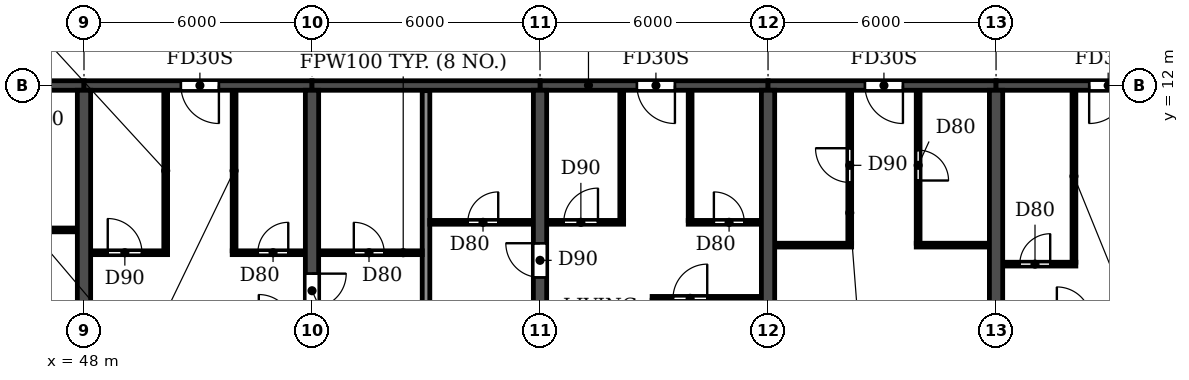
"""IFC4 building model, lengths in metres.
Left out: names, types, materials, properties, quantities, classifications, styles, units other than length and angle.
Written with IfcOpenShell. Run it as: python <this file> out.ifc"""

import sys

from ifc_helpers import new_model, si_unit, direction, frame, frame_2d, origin, place, context, subcontext, project, spatial, rectangle, extrude, element, fill, save


model = new_model("IFC4")
c1 = context("Model", 3, precision=1e-05, world=origin(), true_north=direction((0.0, 1.0)))
c2 = subcontext(c1, "Body", "Model", "MODEL_VIEW")
j1 = project(units=[si_unit("LENGTHUNIT", "METRE"), si_unit("PLANEANGLEUNIT", "RADIAN")], contexts=[c1])
p1 = place(None, origin())
s1 = spatial("IfcSite", under=j1, at=p1, CompositionType="ELEMENT")
p2 = place(p1, origin())
s2 = spatial("IfcBuilding", under=s1, at=p2, CompositionType="ELEMENT")
p3 = place(p2, frame((0.0, 0.0, 76.2)))
s3 = spatial("IfcBuildingStorey", under=s2, at=p3, CompositionType="ELEMENT", Elevation=76.2)
p4 = place(p3, frame((48.0, 0.2, 0.0), z_axis=(0.0, 0.0, 1.0), x_axis=(0.0, 1.0, 0.0)))
e1 = element("IfcWall", 1, at=p4, inside=s3, PredefinedType="SHEAR", context=c2, shape_type="SweptSolid", body=[
    extrude(rectangle(XDim=11.675, YDim=0.35, at=frame_2d((5.837, 0.0))), origin(), (0.0, 0.0, 1.0), 3.06),
])
p5 = place(p3, frame((54.0, 0.2, 0.0), z_axis=(0.0, 0.0, 1.0), x_axis=(0.0, 1.0, 0.0)))
e2 = element("IfcWall", 2, at=p5, inside=s3, PredefinedType="SHEAR", context=c2, shape_type="SweptSolid", body=[
    extrude(rectangle(XDim=11.675, YDim=0.35, at=frame_2d((5.837, 0.0))), origin(), (0.0, 0.0, 1.0), 3.06),
])
p6 = place(p5, frame((5.95, 0.0, 0.0)))
e3 = element("IfcOpeningElement", 3, at=p6, cuts=e2, PredefinedType="OPENING", context=c2, shape_type="SweptSolid", body=[
    extrude(rectangle(XDim=0.9, YDim=2.1, at=frame_2d((0.45, 1.05))), frame((0.0, 0.185, 0.0), z_axis=(0.0, -1.0, 0.0), x_axis=(1.0, 0.0, 0.0)), (0.0, 0.0, 1.0), 0.37),
])
p7 = place(p3, frame((60.0, 0.2, 0.0), z_axis=(0.0, 0.0, 1.0), x_axis=(0.0, 1.0, 0.0)))
e4 = element("IfcWall", 4, at=p7, inside=s3, PredefinedType="SHEAR", context=c2, shape_type="SweptSolid", body=[
    extrude(rectangle(XDim=11.675, YDim=0.35, at=frame_2d((5.837, 0.0))), origin(), (0.0, 0.0, 1.0), 3.06),
])
p8 = place(p7, frame((6.75, 0.0, 0.0)))
e5 = element("IfcOpeningElement", 5, at=p8, cuts=e4, PredefinedType="OPENING", context=c2, shape_type="SweptSolid", body=[
    extrude(rectangle(XDim=0.9, YDim=2.1, at=frame_2d((0.45, 1.05))), frame((0.0, 0.185, 0.0), z_axis=(0.0, -1.0, 0.0), x_axis=(1.0, 0.0, 0.0)), (0.0, 0.0, 1.0), 0.37),
])
for number, where, z_axis, x_axis in (
    (6, (66.0, 0.2, 0.0), (0.0, 0.0, 1.0), (0.0, 1.0, 0.0)),
    (7, (72.0, 0.2, 0.0), (0.0, 0.0, 1.0), (0.0, 1.0, 0.0)),
):
    element("IfcWall", number, at=place(p3, frame(where, z_axis=z_axis, x_axis=x_axis)), inside=s3, PredefinedType="SHEAR", context=c2, shape_type="SweptSolid", body=[
        extrude(rectangle(XDim=11.675, YDim=0.35, at=frame_2d((5.837, 0.0))), origin(), (0.0, 0.0, 1.0), 3.06),
    ])
p9 = place(p3, frame((42.0, 12.0, 0.0), z_axis=(0.0, 0.0, 1.0), x_axis=(1.0, 0.0, 0.0)))
e8 = element("IfcWall", 8, at=p9, inside=s3, PredefinedType="SHEAR", context=c2, shape_type="SweptSolid", body=[
    extrude(rectangle(XDim=6.0, YDim=0.25, at=frame_2d((3.0, 0.0))), origin(), (0.0, 0.0, 1.0), 2.46),
])
p10 = place(p9, frame((2.55, 0.0, 0.0)))
e9 = element("IfcOpeningElement", 9, at=p10, cuts=e8, PredefinedType="OPENING", context=c2, shape_type="SweptSolid", body=[
    extrude(rectangle(XDim=1.0, YDim=2.1, at=frame_2d((0.5, 1.05))), frame((0.0, 0.135, 0.0), z_axis=(0.0, -1.0, 0.0), x_axis=(1.0, 0.0, 0.0)), (0.0, 0.0, 1.0), 0.27),
])
p11 = place(p3, frame((48.0, 12.0, 0.0), z_axis=(0.0, 0.0, 1.0), x_axis=(1.0, 0.0, 0.0)))
e10 = element("IfcWall", 10, at=p11, inside=s3, PredefinedType="SHEAR", context=c2, shape_type="SweptSolid", body=[
    extrude(rectangle(XDim=6.0, YDim=0.25, at=frame_2d((3.0, 0.0))), origin(), (0.0, 0.0, 1.0), 2.46),
])
p12 = place(p11, frame((2.55, 0.0, 0.0)))
e11 = element("IfcOpeningElement", 11, at=p12, cuts=e10, PredefinedType="OPENING", context=c2, shape_type="SweptSolid", body=[
    extrude(rectangle(XDim=1.0, YDim=2.1, at=frame_2d((0.5, 1.05))), frame((0.0, 0.135, 0.0), z_axis=(0.0, -1.0, 0.0), x_axis=(1.0, 0.0, 0.0)), (0.0, 0.0, 1.0), 0.27),
])
p13 = place(p3, frame((54.0, 12.0, 0.0), z_axis=(0.0, 0.0, 1.0), x_axis=(1.0, 0.0, 0.0)))
e12 = element("IfcWall", 12, at=p13, inside=s3, PredefinedType="SHEAR", context=c2, shape_type="SweptSolid", body=[
    extrude(rectangle(XDim=6.0, YDim=0.25, at=frame_2d((3.0, 0.0))), origin(), (0.0, 0.0, 1.0), 2.46),
])
p14 = place(p3, frame((60.0, 12.0, 0.0), z_axis=(0.0, 0.0, 1.0), x_axis=(1.0, 0.0, 0.0)))
e13 = element("IfcWall", 13, at=p14, inside=s3, PredefinedType="SHEAR", context=c2, shape_type="SweptSolid", body=[
    extrude(rectangle(XDim=6.0, YDim=0.25, at=frame_2d((3.0, 0.0))), origin(), (0.0, 0.0, 1.0), 2.46),
])
p15 = place(p14, frame((2.55, 0.0, 0.0)))
e14 = element("IfcOpeningElement", 14, at=p15, cuts=e13, PredefinedType="OPENING", context=c2, shape_type="SweptSolid", body=[
    extrude(rectangle(XDim=1.0, YDim=2.1, at=frame_2d((0.5, 1.05))), frame((0.0, 0.135, 0.0), z_axis=(0.0, -1.0, 0.0), x_axis=(1.0, 0.0, 0.0)), (0.0, 0.0, 1.0), 0.27),
])
p16 = place(p3, frame((66.0, 12.0, 0.0), z_axis=(0.0, 0.0, 1.0), x_axis=(1.0, 0.0, 0.0)))
e15 = element("IfcWall", 15, at=p16, inside=s3, PredefinedType="SHEAR", context=c2, shape_type="SweptSolid", body=[
    extrude(rectangle(XDim=6.0, YDim=0.25, at=frame_2d((3.0, 0.0))), origin(), (0.0, 0.0, 1.0), 2.46),
])
p17 = place(p16, frame((2.55, 0.0, 0.0)))
e16 = element("IfcOpeningElement", 16, at=p17, cuts=e15, PredefinedType="OPENING", context=c2, shape_type="SweptSolid", body=[
    extrude(rectangle(XDim=1.0, YDim=2.1, at=frame_2d((0.5, 1.05))), frame((0.0, 0.135, 0.0), z_axis=(0.0, -1.0, 0.0), x_axis=(1.0, 0.0, 0.0)), (0.0, 0.0, 1.0), 0.27),
])
p18 = place(p3, frame((72.0, 12.0, 0.0), z_axis=(0.0, 0.0, 1.0), x_axis=(1.0, 0.0, 0.0)))
e17 = element("IfcWall", 17, at=p18, inside=s3, PredefinedType="SHEAR", context=c2, shape_type="SweptSolid", body=[
    extrude(rectangle(XDim=6.0, YDim=0.25, at=frame_2d((3.0, 0.0))), origin(), (0.0, 0.0, 1.0), 2.46),
])
p19 = place(p18, frame((2.45, 0.0, 0.0)))
e18 = element("IfcOpeningElement", 18, at=p19, cuts=e17, PredefinedType="OPENING", context=c2, shape_type="SweptSolid", body=[
    extrude(rectangle(XDim=1.0, YDim=2.1, at=frame_2d((0.5, 1.05))), frame((0.0, 0.135, 0.0), z_axis=(0.0, -1.0, 0.0), x_axis=(1.0, 0.0, 0.0)), (0.0, 0.0, 1.0), 0.27),
])
p20 = place(p3, frame((57.0, 0.06, 0.0), z_axis=(0.0, 0.0, 1.0), x_axis=(0.0, 1.0, 0.0)))
e19 = element("IfcWall", 19, at=p20, inside=s3, PredefinedType="PARTITIONING", context=c2, shape_type="SweptSolid", body=[
    extrude(rectangle(XDim=11.805, YDim=0.2, at=frame_2d((5.902, 0.0))), origin(), (0.0, 0.0, 1.0), 3.06),
])
p21 = place(p3, frame((62.95, 6.4, 0.0), z_axis=(0.0, 0.0, 1.0), x_axis=(1.0, 0.0, 0.0)))
e20 = element("IfcWall", 20, at=p21, inside=s3, PredefinedType="PARTITIONING", context=c2, shape_type="SweptSolid", body=[
    extrude(rectangle(XDim=2.865, YDim=0.1, at=frame_2d((1.433, 0.0))), origin(), (0.0, 0.0, 1.0), 3.06),
])
p22 = place(p21, frame((0.55, 0.0, 0.0)))
e21 = element("IfcOpeningElement", 21, at=p22, cuts=e20, PredefinedType="OPENING", context=c2, shape_type="SweptSolid", body=[
    extrude(rectangle(XDim=0.9, YDim=2.1, at=frame_2d((0.45, 1.05))), frame((0.0, 0.06, 0.0), z_axis=(0.0, -1.0, 0.0), x_axis=(1.0, 0.0, 0.0)), (0.0, 0.0, 1.0), 0.12),
])
p23 = place(p3, frame((72.185, 7.3, 0.0), z_axis=(0.0, 0.0, 1.0), x_axis=(1.0, 0.0, 0.0)))
e22 = element("IfcWall", 22, at=p23, inside=s3, PredefinedType="PARTITIONING", context=c2, shape_type="SweptSolid", body=[
    extrude(rectangle(XDim=1.915, YDim=0.1, at=frame_2d((0.958, 0.0))), origin(), (0.0, 0.0, 1.0), 3.06),
])
p24 = place(p23, frame((0.44, 0.0, 0.0)))
e23 = element("IfcOpeningElement", 23, at=p24, cuts=e22, PredefinedType="OPENING", context=c2, shape_type="SweptSolid", body=[
    extrude(rectangle(XDim=0.8, YDim=2.1, at=frame_2d((0.4, 1.05))), frame((0.0, 0.06, 0.0), z_axis=(0.0, -1.0, 0.0), x_axis=(1.0, 0.0, 0.0)), (0.0, 0.0, 1.0), 0.12),
])
p25 = place(p3, frame((48.185, 7.6, 0.0), z_axis=(0.0, 0.0, 1.0), x_axis=(1.0, 0.0, 0.0)))
e24 = element("IfcWall", 24, at=p25, inside=s3, PredefinedType="PARTITIONING", context=c2, shape_type="SweptSolid", body=[
    extrude(rectangle(XDim=2.015, YDim=0.1, at=frame_2d((1.007, 0.0))), origin(), (0.0, 0.0, 1.0), 3.06),
])
p26 = place(p25, frame((0.44, 0.0, 0.0)))
e25 = element("IfcOpeningElement", 25, at=p26, cuts=e24, PredefinedType="OPENING", context=c2, shape_type="SweptSolid", body=[
    extrude(rectangle(XDim=0.9, YDim=2.1, at=frame_2d((0.45, 1.05))), frame((0.0, 0.06, 0.0), z_axis=(0.0, -1.0, 0.0), x_axis=(1.0, 0.0, 0.0)), (0.0, 0.0, 1.0), 0.12),
])
p27 = place(p3, frame((51.9, 7.6, 0.0), z_axis=(0.0, 0.0, 1.0), x_axis=(1.0, 0.0, 0.0)))
e26 = element("IfcWall", 26, at=p27, inside=s3, PredefinedType="PARTITIONING", context=c2, shape_type="SweptSolid", body=[
    extrude(rectangle(XDim=1.915, YDim=0.1, at=frame_2d((0.958, 0.0))), origin(), (0.0, 0.0, 1.0), 3.06),
])
p28 = place(p27, frame((0.675, 0.0, 0.0)))
e27 = element("IfcOpeningElement", 27, at=p28, cuts=e26, PredefinedType="OPENING", context=c2, shape_type="SweptSolid", body=[
    extrude(rectangle(XDim=0.8, YDim=2.1, at=frame_2d((0.4, 1.05))), frame((0.0, 0.06, 0.0), z_axis=(0.0, -1.0, 0.0), x_axis=(1.0, 0.0, 0.0)), (0.0, 0.0, 1.0), 0.12),
])
p29 = place(p3, frame((54.185, 7.6, 0.0), z_axis=(0.0, 0.0, 1.0), x_axis=(1.0, 0.0, 0.0)))
e28 = element("IfcWall", 28, at=p29, inside=s3, PredefinedType="PARTITIONING", context=c2, shape_type="SweptSolid", body=[
    extrude(rectangle(XDim=2.715, YDim=0.1, at=frame_2d((1.357, 0.0))), origin(), (0.0, 0.0, 1.0), 3.06),
])
p30 = place(p29, frame((0.915, 0.0, 0.0)))
e29 = element("IfcOpeningElement", 29, at=p30, cuts=e28, PredefinedType="OPENING", context=c2, shape_type="SweptSolid", body=[
    extrude(rectangle(XDim=0.8, YDim=2.1, at=frame_2d((0.4, 1.05))), frame((0.0, 0.06, 0.0), z_axis=(0.0, -1.0, 0.0), x_axis=(1.0, 0.0, 0.0)), (0.0, 0.0, 1.0), 0.12),
])
p31 = place(p3, frame((66.185, 7.8, 0.0), z_axis=(0.0, 0.0, 1.0), x_axis=(1.0, 0.0, 0.0)))
e30 = element("IfcWall", 30, at=p31, inside=s3, PredefinedType="PARTITIONING", context=c2, shape_type="SweptSolid", body=[
    extrude(rectangle(XDim=2.015, YDim=0.1, at=frame_2d((1.007, 0.0))), origin(), (0.0, 0.0, 1.0), 3.06),
])
for number, where, z_axis, x_axis in (
    (31, (69.9, 7.8, 0.0), (0.0, 0.0, 1.0), (1.0, 0.0, 0.0)),
    (32, (45.9, 8.2, 0.0), (0.0, 0.0, 1.0), (1.0, 0.0, 0.0)),
):
    element("IfcWall", number, at=place(p3, frame(where, z_axis=z_axis, x_axis=x_axis)), inside=s3, PredefinedType="PARTITIONING", context=c2, shape_type="SweptSolid", body=[
        extrude(rectangle(XDim=1.915, YDim=0.1, at=frame_2d((0.958, 0.0))), origin(), (0.0, 0.0, 1.0), 3.06),
    ])
p32 = place(p3, frame((57.1, 8.4, 0.0), z_axis=(0.0, 0.0, 1.0), x_axis=(1.0, 0.0, 0.0)))
e33 = element("IfcWall", 33, at=p32, inside=s3, PredefinedType="PARTITIONING", context=c2, shape_type="SweptSolid", body=[
    extrude(rectangle(XDim=2.715, YDim=0.1, at=frame_2d((1.357, 0.0))), origin(), (0.0, 0.0, 1.0), 3.06),
])
p33 = place(p32, frame((1.0, 0.0, 0.0)))
e34 = element("IfcOpeningElement", 34, at=p33, cuts=e33, PredefinedType="OPENING", context=c2, shape_type="SweptSolid", body=[
    extrude(rectangle(XDim=0.8, YDim=2.1, at=frame_2d((0.4, 1.05))), frame((0.0, 0.06, 0.0), z_axis=(0.0, -1.0, 0.0), x_axis=(1.0, 0.0, 0.0)), (0.0, 0.0, 1.0), 0.12),
])
p34 = place(p3, frame((60.185, 8.4, 0.0), z_axis=(0.0, 0.0, 1.0), x_axis=(1.0, 0.0, 0.0)))
e35 = element("IfcWall", 35, at=p34, inside=s3, PredefinedType="PARTITIONING", context=c2, shape_type="SweptSolid", body=[
    extrude(rectangle(XDim=2.015, YDim=0.1, at=frame_2d((1.007, 0.0))), origin(), (0.0, 0.0, 1.0), 3.06),
])
p35 = place(p34, frame((0.44, 0.0, 0.0)))
e36 = element("IfcOpeningElement", 36, at=p35, cuts=e35, PredefinedType="OPENING", context=c2, shape_type="SweptSolid", body=[
    extrude(rectangle(XDim=0.9, YDim=2.1, at=frame_2d((0.45, 1.05))), frame((0.0, 0.06, 0.0), z_axis=(0.0, -1.0, 0.0), x_axis=(1.0, 0.0, 0.0)), (0.0, 0.0, 1.0), 0.12),
])
p36 = place(p3, frame((63.9, 8.4, 0.0), z_axis=(0.0, 0.0, 1.0), x_axis=(1.0, 0.0, 0.0)))
e37 = element("IfcWall", 37, at=p36, inside=s3, PredefinedType="PARTITIONING", context=c2, shape_type="SweptSolid", body=[
    extrude(rectangle(XDim=1.915, YDim=0.1, at=frame_2d((0.958, 0.0))), origin(), (0.0, 0.0, 1.0), 3.06),
])
p37 = place(p36, frame((0.675, 0.0, 0.0)))
e38 = element("IfcOpeningElement", 38, at=p37, cuts=e37, PredefinedType="OPENING", context=c2, shape_type="SweptSolid", body=[
    extrude(rectangle(XDim=0.8, YDim=2.1, at=frame_2d((0.4, 1.05))), frame((0.0, 0.06, 0.0), z_axis=(0.0, -1.0, 0.0), x_axis=(1.0, 0.0, 0.0)), (0.0, 0.0, 1.0), 0.12),
])
for number, where, z_axis, x_axis in (
    (39, (50.15, 7.65, 0.0), (0.0, 0.0, 1.0), (0.0, 1.0, 0.0)),
    (40, (51.95, 7.65, 0.0), (0.0, 0.0, 1.0), (0.0, 1.0, 0.0)),
):
    element("IfcWall", number, at=place(p3, frame(where, z_axis=z_axis, x_axis=x_axis)), inside=s3, PredefinedType="PARTITIONING", context=c2, shape_type="SweptSolid", body=[
        extrude(rectangle(XDim=4.215, YDim=0.1, at=frame_2d((2.107, 0.0))), origin(), (0.0, 0.0, 1.0), 3.06),
    ])
for number, where, z_axis, x_axis in (
    (41, (62.15, 8.45, 0.0), (0.0, 0.0, 1.0), (0.0, 1.0, 0.0)),
    (42, (63.95, 8.45, 0.0), (0.0, 0.0, 1.0), (0.0, 1.0, 0.0)),
):
    element("IfcWall", number, at=place(p3, frame(where, z_axis=z_axis, x_axis=x_axis)), inside=s3, PredefinedType="PARTITIONING", context=c2, shape_type="SweptSolid", body=[
        extrude(rectangle(XDim=3.415, YDim=0.1, at=frame_2d((1.708, 0.0))), origin(), (0.0, 0.0, 1.0), 3.06),
    ])
p38 = place(p3, frame((68.15, 7.85, 0.0), z_axis=(0.0, 0.0, 1.0), x_axis=(0.0, 1.0, 0.0)))
e43 = element("IfcWall", 43, at=p38, inside=s3, PredefinedType="PARTITIONING", context=c2, shape_type="SweptSolid", body=[
    extrude(rectangle(XDim=4.015, YDim=0.1, at=frame_2d((2.007, 0.0))), origin(), (0.0, 0.0, 1.0), 3.06),
])
p39 = place(p38, frame((1.6, 0.0, 0.0)))
e44 = element("IfcOpeningElement", 44, at=p39, cuts=e43, PredefinedType="OPENING", context=c2, shape_type="SweptSolid", body=[
    extrude(rectangle(XDim=0.9, YDim=2.1, at=frame_2d((0.45, 1.05))), frame((0.0, 0.06, 0.0), z_axis=(0.0, -1.0, 0.0), x_axis=(1.0, 0.0, 0.0)), (0.0, 0.0, 1.0), 0.12),
])
p40 = place(p3, frame((69.95, 7.85, 0.0), z_axis=(0.0, 0.0, 1.0), x_axis=(0.0, 1.0, 0.0)))
e45 = element("IfcWall", 45, at=p40, inside=s3, PredefinedType="PARTITIONING", context=c2, shape_type="SweptSolid", body=[
    extrude(rectangle(XDim=4.015, YDim=0.1, at=frame_2d((2.007, 0.0))), origin(), (0.0, 0.0, 1.0), 3.06),
])
p41 = place(p40, frame((1.65, 0.0, 0.0)))
e46 = element("IfcOpeningElement", 46, at=p41, cuts=e45, PredefinedType="OPENING", context=c2, shape_type="SweptSolid", body=[
    extrude(rectangle(XDim=0.8, YDim=2.1, at=frame_2d((0.4, 1.05))), frame((0.0, 0.06, 0.0), z_axis=(0.0, -1.0, 0.0), x_axis=(1.0, 0.0, 0.0)), (0.0, 0.0, 1.0), 0.12),
])
p42 = place(p3, frame((74.05, 7.35, 0.0), z_axis=(0.0, 0.0, 1.0), x_axis=(0.0, 1.0, 0.0)))
e47 = element("IfcWall", 47, at=p42, inside=s3, PredefinedType="PARTITIONING", context=c2, shape_type="SweptSolid", body=[
    extrude(rectangle(XDim=4.515, YDim=0.1, at=frame_2d((2.257, 0.0))), origin(), (0.0, 0.0, 1.0), 3.06),
])
p43 = place(p30, origin())
e48 = element("IfcDoor", 48, at=p43, inside=s3, OperationType="SINGLE_SWING_LEFT", PredefinedType="DOOR", context=c2, shape_type="SweptSolid", body=[
    extrude(rectangle(XDim=0.8, YDim=2.1, at=frame_2d((0.4, 1.05))), frame((0.0, 0.025, 0.0), z_axis=(0.0, -1.0, 0.0), x_axis=(1.0, 0.0, 0.0)), (0.0, 0.0, 1.0), 0.05),
])
fill(e29, e48)
p44 = place(p26, origin())
e49 = element("IfcDoor", 49, at=p44, inside=s3, OperationType="SINGLE_SWING_LEFT", PredefinedType="DOOR", context=c2, shape_type="SweptSolid", body=[
    extrude(rectangle(XDim=0.9, YDim=2.1, at=frame_2d((0.45, 1.05))), frame((0.0, 0.025, 0.0), z_axis=(0.0, -1.0, 0.0), x_axis=(1.0, 0.0, 0.0)), (0.0, 0.0, 1.0), 0.05),
])
fill(e25, e49)
p45 = place(p12, frame((1.0, 0.0, 0.0), z_axis=(0.0, 0.0, 1.0), x_axis=(-1.0, 0.0, 0.0)))
e50 = element("IfcDoor", 50, at=p45, inside=s3, OperationType="SINGLE_SWING_LEFT", PredefinedType="DOOR", context=c2, shape_type="SweptSolid", body=[
    extrude(rectangle(XDim=1.0, YDim=2.1, at=frame_2d((0.5, 1.05))), frame((0.0, 0.025, 0.0), z_axis=(0.0, -1.0, 0.0), x_axis=(1.0, 0.0, 0.0)), (0.0, 0.0, 1.0), 0.05),
])
fill(e11, e50)
p46 = place(p28, origin())
e51 = element("IfcDoor", 51, at=p46, inside=s3, OperationType="SINGLE_SWING_RIGHT", PredefinedType="DOOR", context=c2, shape_type="SweptSolid", body=[
    extrude(rectangle(XDim=0.8, YDim=2.1, at=frame_2d((0.4, 1.05))), frame((0.0, 0.025, 0.0), z_axis=(0.0, -1.0, 0.0), x_axis=(1.0, 0.0, 0.0)), (0.0, 0.0, 1.0), 0.05),
])
fill(e27, e51)
p47 = place(p6, frame((0.9, 0.0, 0.0), z_axis=(0.0, 0.0, 1.0), x_axis=(-1.0, 0.0, 0.0)))
e52 = element("IfcDoor", 52, at=p47, inside=s3, OperationType="SINGLE_SWING_LEFT", PredefinedType="DOOR", context=c2, shape_type="SweptSolid", body=[
    extrude(rectangle(XDim=0.9, YDim=2.1, at=frame_2d((0.45, 1.05))), frame((0.0, 0.025, 0.0), z_axis=(0.0, -1.0, 0.0), x_axis=(1.0, 0.0, 0.0)), (0.0, 0.0, 1.0), 0.05),
])
fill(e3, e52)
p48 = place(p33, origin())
e53 = element("IfcDoor", 53, at=p48, inside=s3, OperationType="SINGLE_SWING_RIGHT", PredefinedType="DOOR", context=c2, shape_type="SweptSolid", body=[
    extrude(rectangle(XDim=0.8, YDim=2.1, at=frame_2d((0.4, 1.05))), frame((0.0, 0.025, 0.0), z_axis=(0.0, -1.0, 0.0), x_axis=(1.0, 0.0, 0.0)), (0.0, 0.0, 1.0), 0.05),
])
fill(e34, e53)
p49 = place(p8, origin())
e54 = element("IfcDoor", 54, at=p49, inside=s3, OperationType="SINGLE_SWING_RIGHT", PredefinedType="DOOR", context=c2, shape_type="SweptSolid", body=[
    extrude(rectangle(XDim=0.9, YDim=2.1, at=frame_2d((0.45, 1.05))), frame((0.0, 0.025, 0.0), z_axis=(0.0, -1.0, 0.0), x_axis=(1.0, 0.0, 0.0)), (0.0, 0.0, 1.0), 0.05),
])
fill(e5, e54)
p50 = place(p35, origin())
e55 = element("IfcDoor", 55, at=p50, inside=s3, OperationType="SINGLE_SWING_RIGHT", PredefinedType="DOOR", context=c2, shape_type="SweptSolid", body=[
    extrude(rectangle(XDim=0.9, YDim=2.1, at=frame_2d((0.45, 1.05))), frame((0.0, 0.025, 0.0), z_axis=(0.0, -1.0, 0.0), x_axis=(1.0, 0.0, 0.0)), (0.0, 0.0, 1.0), 0.05),
])
fill(e36, e55)
p51 = place(p15, frame((1.0, 0.0, 0.0), z_axis=(0.0, 0.0, 1.0), x_axis=(-1.0, 0.0, 0.0)))
e56 = element("IfcDoor", 56, at=p51, inside=s3, OperationType="SINGLE_SWING_LEFT", PredefinedType="DOOR", context=c2, shape_type="SweptSolid", body=[
    extrude(rectangle(XDim=1.0, YDim=2.1, at=frame_2d((0.5, 1.05))), frame((0.0, 0.025, 0.0), z_axis=(0.0, -1.0, 0.0), x_axis=(1.0, 0.0, 0.0)), (0.0, 0.0, 1.0), 0.05),
])
fill(e14, e56)
p52 = place(p22, origin())
e57 = element("IfcDoor", 57, at=p52, inside=s3, OperationType="SINGLE_SWING_RIGHT", PredefinedType="DOOR", context=c2, shape_type="SweptSolid", body=[
    extrude(rectangle(XDim=0.9, YDim=2.1, at=frame_2d((0.45, 1.05))), frame((0.0, 0.025, 0.0), z_axis=(0.0, -1.0, 0.0), x_axis=(1.0, 0.0, 0.0)), (0.0, 0.0, 1.0), 0.05),
])
fill(e21, e57)
p53 = place(p37, origin())
e58 = element("IfcDoor", 58, at=p53, inside=s3, OperationType="SINGLE_SWING_LEFT", PredefinedType="DOOR", context=c2, shape_type="SweptSolid", body=[
    extrude(rectangle(XDim=0.8, YDim=2.1, at=frame_2d((0.4, 1.05))), frame((0.0, 0.025, 0.0), z_axis=(0.0, -1.0, 0.0), x_axis=(1.0, 0.0, 0.0)), (0.0, 0.0, 1.0), 0.05),
])
fill(e38, e58)
p54 = place(p39, origin())
e59 = element("IfcDoor", 59, at=p54, inside=s3, OperationType="SINGLE_SWING_RIGHT", PredefinedType="DOOR", context=c2, shape_type="SweptSolid", body=[
    extrude(rectangle(XDim=0.9, YDim=2.1, at=frame_2d((0.45, 1.05))), frame((0.0, 0.025, 0.0), z_axis=(0.0, -1.0, 0.0), x_axis=(1.0, 0.0, 0.0)), (0.0, 0.0, 1.0), 0.05),
])
fill(e44, e59)
p55 = place(p17, frame((1.0, 0.0, 0.0), z_axis=(0.0, 0.0, 1.0), x_axis=(-1.0, 0.0, 0.0)))
e60 = element("IfcDoor", 60, at=p55, inside=s3, OperationType="SINGLE_SWING_LEFT", PredefinedType="DOOR", context=c2, shape_type="SweptSolid", body=[
    extrude(rectangle(XDim=1.0, YDim=2.1, at=frame_2d((0.5, 1.05))), frame((0.0, 0.025, 0.0), z_axis=(0.0, -1.0, 0.0), x_axis=(1.0, 0.0, 0.0)), (0.0, 0.0, 1.0), 0.05),
])
fill(e16, e60)
p56 = place(p41, frame((0.8, 0.0, 0.0), z_axis=(0.0, 0.0, 1.0), x_axis=(-1.0, 0.0, 0.0)))
e61 = element("IfcDoor", 61, at=p56, inside=s3, OperationType="SINGLE_SWING_RIGHT", PredefinedType="DOOR", context=c2, shape_type="SweptSolid", body=[
    extrude(rectangle(XDim=0.8, YDim=2.1, at=frame_2d((0.4, 1.05))), frame((0.0, 0.025, 0.0), z_axis=(0.0, -1.0, 0.0), x_axis=(1.0, 0.0, 0.0)), (0.0, 0.0, 1.0), 0.05),
])
fill(e46, e61)
p57 = place(p24, origin())
e62 = element("IfcDoor", 62, at=p57, inside=s3, OperationType="SINGLE_SWING_RIGHT", PredefinedType="DOOR", context=c2, shape_type="SweptSolid", body=[
    extrude(rectangle(XDim=0.8, YDim=2.1, at=frame_2d((0.4, 1.05))), frame((0.0, 0.025, 0.0), z_axis=(0.0, -1.0, 0.0), x_axis=(1.0, 0.0, 0.0)), (0.0, 0.0, 1.0), 0.05),
])
fill(e23, e62)
p58 = place(p19, frame((1.0, 0.0, 0.0), z_axis=(0.0, 0.0, 1.0), x_axis=(-1.0, 0.0, 0.0)))
e63 = element("IfcDoor", 63, at=p58, inside=s3, OperationType="SINGLE_SWING_RIGHT", PredefinedType="DOOR", context=c2, shape_type="SweptSolid", body=[
    extrude(rectangle(XDim=1.0, YDim=2.1, at=frame_2d((0.5, 1.05))), frame((0.0, 0.025, 0.0), z_axis=(0.0, -1.0, 0.0), x_axis=(1.0, 0.0, 0.0)), (0.0, 0.0, 1.0), 0.05),
])
fill(e18, e63)
save(model, sys.argv[1])
